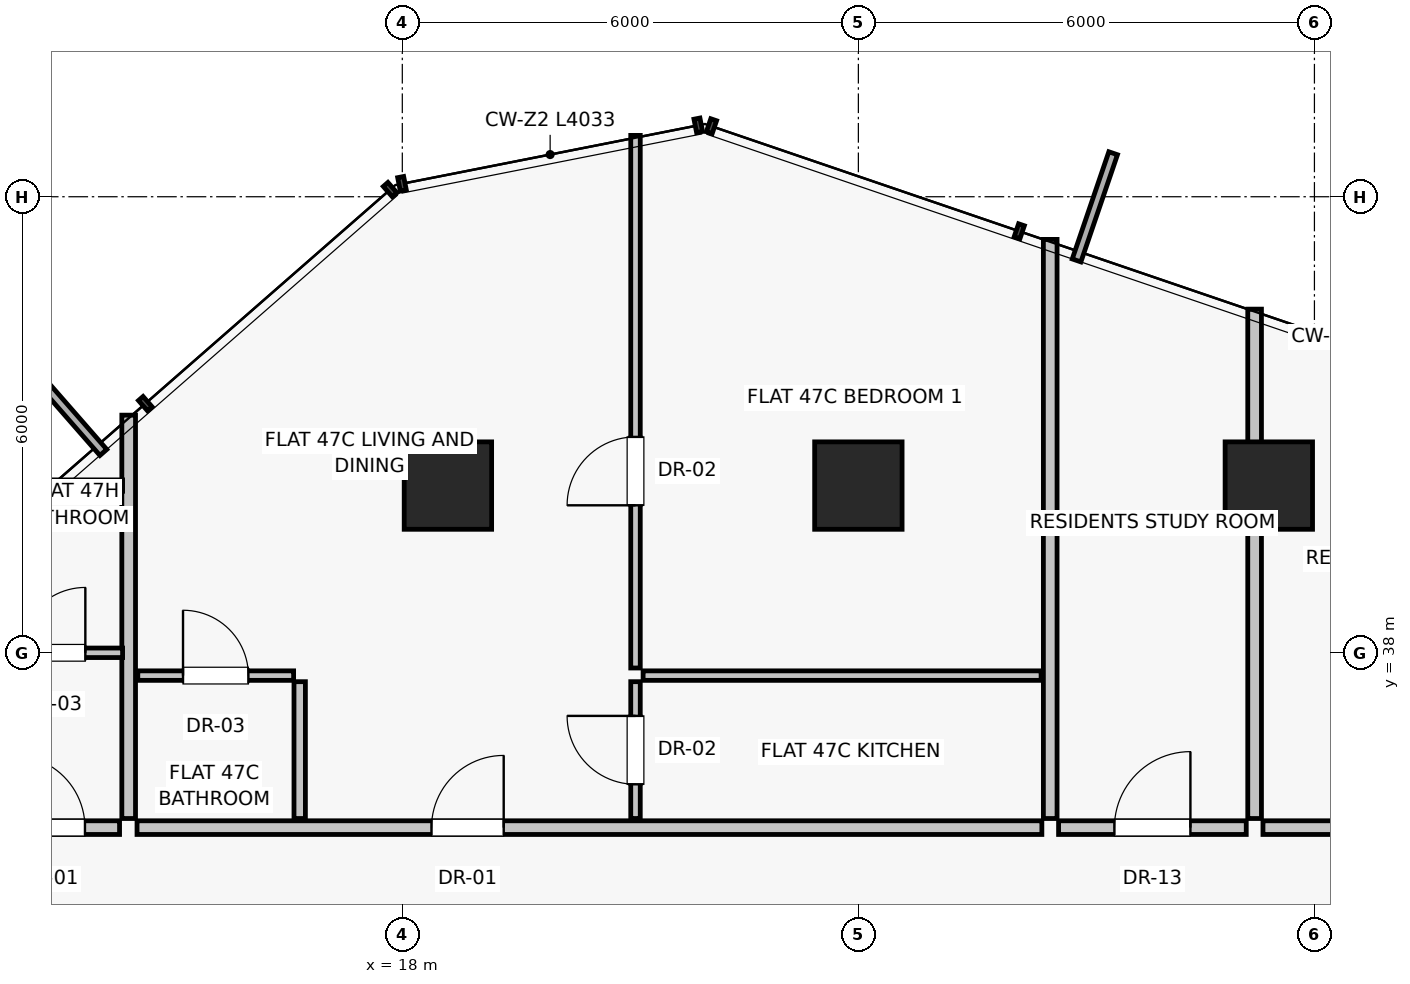
"""IFC4 building model, lengths in metres.
Left out: names, types, materials, properties, quantities, classifications, styles, units other than length and angle.
Written with IfcOpenShell. Run it as: python <this file> out.ifc"""

import sys

from ifc_helpers import new_model, si_unit, direction, frame, frame_2d, origin, origin_2d, place, context, subcontext, project, spatial, rectangle, extrude, source, transform, mapped, element, fill, save


model = new_model("IFC4")
c1 = context("Model", 3, precision=1e-05, world=origin(), true_north=direction((0.0, 1.0)))
c2 = subcontext(c1, "Body", "Model", "MODEL_VIEW")
j1 = project(units=[si_unit("LENGTHUNIT", "METRE"), si_unit("PLANEANGLEUNIT", "RADIAN")], contexts=[c1])
p1 = place(None, origin())
s1 = spatial("IfcSite", under=j1, at=p1, CompositionType="ELEMENT")
p2 = place(p1, origin())
s2 = spatial("IfcBuilding", under=s1, at=p2, CompositionType="ELEMENT")
p3 = place(p2, frame((0.0, 0.0, 166.3)))
s3 = spatial("IfcBuildingStorey", under=s2, at=p3, CompositionType="ELEMENT", Elevation=166.3)
for number, where, z_axis, x_axis in (
    (1, (29.4, 40.2, 0.0), (0.0, 0.0, 1.0), (1.0, 0.0, 0.0)),
    (2, (24.0, 40.2, 0.0), (0.0, 0.0, 1.0), (1.0, 0.0, 0.0)),
    (3, (18.6, 40.2, 0.0), (0.0, 0.0, 1.0), (1.0, 0.0, 0.0)),
):
    element("IfcColumn", number, at=place(p3, frame(where, z_axis=z_axis, x_axis=x_axis)), inside=s3, PredefinedType="COLUMN", context=c2, shape_type="SweptSolid", body=[
        extrude(rectangle(XDim=1.15, YDim=1.15, at=origin_2d()), origin(), (0.0, 0.0, 1.0), 3.25),
    ])
p4 = place(p3, frame((14.4, 35.82, 0.0), z_axis=(0.0, 0.0, 1.0), x_axis=(0.0, 1.0, 0.0)))
e4 = element("IfcWall", 4, at=p4, inside=s3, PredefinedType="PARTITIONING", context=c2, shape_type="SweptSolid", body=[
    extrude(rectangle(XDim=5.306, YDim=0.18, at=frame_2d((2.653, 0.0))), origin(), (0.0, 0.0, 1.0), 2.93),
])
p5 = place(p3, frame((14.51, 35.7, 0.0), z_axis=(0.0, 0.0, 1.0), x_axis=(1.0, 0.0, 0.0)))
e5 = element("IfcWall", 5, at=p5, inside=s3, PredefinedType="PARTITIONING", context=c2, shape_type="SweptSolid", body=[
    extrude(rectangle(XDim=11.904, YDim=0.18, at=frame_2d((5.952, 0.0))), origin(), (0.0, 0.0, 1.0), 2.51),
])
p6 = place(p5, frame((3.874, 0.0, 0.0)))
e6 = element("IfcOpeningElement", 6, at=p6, cuts=e5, PredefinedType="OPENING", context=c2, shape_type="SweptSolid", body=[
    extrude(rectangle(XDim=0.95, YDim=2.02, at=frame_2d((0.475, 1.01))), frame((0.0, 0.1, 0.0), z_axis=(0.0, -1.0, 0.0), x_axis=(1.0, 0.0, 0.0)), (0.0, 0.0, 1.0), 0.2),
])
p7 = place(p3, frame((16.65, 35.82, 0.0), z_axis=(0.0, 0.0, 1.0), x_axis=(0.0, 1.0, 0.0)))
e7 = element("IfcWall", 7, at=p7, inside=s3, PredefinedType="PARTITIONING", context=c2, shape_type="SweptSolid", body=[
    extrude(rectangle(XDim=1.8, YDim=0.15, at=frame_2d((0.9, 0.0))), origin(), (0.0, 0.0, 1.0), 2.93),
])
p8 = place(p3, frame((14.52, 37.7, 0.0), z_axis=(0.0, 0.0, 1.0), x_axis=(1.0, 0.0, 0.0)))
e8 = element("IfcWall", 8, at=p8, inside=s3, PredefinedType="PARTITIONING", context=c2, shape_type="SweptSolid", body=[
    extrude(rectangle(XDim=2.05, YDim=0.125, at=frame_2d((1.025, 0.0))), origin(), (0.0, 0.0, 1.0), 2.93),
])
p9 = place(p8, frame((0.595, 0.0, 0.0)))
e9 = element("IfcOpeningElement", 9, at=p9, cuts=e8, PredefinedType="OPENING", context=c2, shape_type="SweptSolid", body=[
    extrude(rectangle(XDim=0.86, YDim=2.01, at=frame_2d((0.43, 1.005))), frame((0.0, 0.073, 0.0), z_axis=(0.0, -1.0, 0.0), x_axis=(1.0, 0.0, 0.0)), (0.0, 0.0, 1.0), 0.145),
])
p10 = place(p3, frame((21.068, 35.82, 0.0), z_axis=(0.0, 0.0, 1.0), x_axis=(0.0, 1.0, 0.0)))
e10 = element("IfcWall", 10, at=p10, inside=s3, PredefinedType="PARTITIONING", context=c2, shape_type="SweptSolid", body=[
    extrude(rectangle(XDim=1.8, YDim=0.125, at=frame_2d((0.9, 0.0))), origin(), (0.0, 0.0, 1.0), 2.93),
])
p11 = place(p10, frame((0.45, 0.0, 0.0)))
e11 = element("IfcOpeningElement", 11, at=p11, cuts=e10, PredefinedType="OPENING", context=c2, shape_type="SweptSolid", body=[
    extrude(rectangle(XDim=0.9, YDim=2.01, at=frame_2d((0.45, 1.005))), frame((0.0, 0.073, 0.0), z_axis=(0.0, -1.0, 0.0), x_axis=(1.0, 0.0, 0.0)), (0.0, 0.0, 1.0), 0.145),
])
p12 = place(p3, frame((21.168, 37.7, 0.0), z_axis=(0.0, 0.0, 1.0), x_axis=(1.0, 0.0, 0.0)))
e12 = element("IfcWall", 12, at=p12, inside=s3, PredefinedType="PARTITIONING", context=c2, shape_type="SweptSolid", body=[
    extrude(rectangle(XDim=5.236, YDim=0.125, at=frame_2d((2.618, 0.0))), origin(), (0.0, 0.0, 1.0), 2.93),
])
p13 = place(p3, frame((21.068, 37.8, 0.0), z_axis=(0.0, 0.0, 1.0), x_axis=(0.0, 1.0, 0.0)))
e13 = element("IfcWall", 13, at=p13, inside=s3, PredefinedType="PARTITIONING", context=c2, shape_type="SweptSolid", body=[
    extrude(rectangle(XDim=7.007, YDim=0.125, at=frame_2d((3.503, 0.0))), origin(), (0.0, 0.0, 1.0), 2.93),
])
p14 = place(p13, frame((2.14, 0.0, 0.0)))
e14 = element("IfcOpeningElement", 14, at=p14, cuts=e13, PredefinedType="OPENING", context=c2, shape_type="SweptSolid", body=[
    extrude(rectangle(XDim=0.9, YDim=2.01, at=frame_2d((0.45, 1.005))), frame((0.0, 0.073, 0.0), z_axis=(0.0, -1.0, 0.0), x_axis=(1.0, 0.0, 0.0)), (0.0, 0.0, 1.0), 0.145),
])
p15 = place(p3, frame((26.524, 35.82, 0.0), z_axis=(0.0, 0.0, 1.0), x_axis=(0.0, 1.0, 0.0)))
e15 = element("IfcWall", 15, at=p15, inside=s3, PredefinedType="PARTITIONING", context=c2, shape_type="SweptSolid", body=[
    extrude(rectangle(XDim=7.619, YDim=0.18, at=frame_2d((3.809, 0.0))), origin(), (0.0, 0.0, 1.0), 2.93),
])
p16 = place(p3, frame((26.634, 35.7, 0.0), z_axis=(0.0, 0.0, 1.0), x_axis=(1.0, 0.0, 0.0)))
e16 = element("IfcWall", 16, at=p16, inside=s3, PredefinedType="PARTITIONING", context=c2, shape_type="SweptSolid", body=[
    extrude(rectangle(XDim=2.469, YDim=0.18, at=frame_2d((1.234, 0.0))), origin(), (0.0, 0.0, 1.0), 2.51),
])
p17 = place(p16, frame((0.735, 0.0, 0.0)))
e17 = element("IfcOpeningElement", 17, at=p17, cuts=e16, PredefinedType="OPENING", context=c2, shape_type="SweptSolid", body=[
    extrude(rectangle(XDim=1.0, YDim=2.01, at=frame_2d((0.5, 1.005))), frame((0.0, 0.1, 0.0), z_axis=(0.0, -1.0, 0.0), x_axis=(1.0, 0.0, 0.0)), (0.0, 0.0, 1.0), 0.2),
])
p18 = place(p3, frame((29.323, 35.7, 0.0), z_axis=(0.0, 0.0, 1.0), x_axis=(1.0, 0.0, 0.0)))
e18 = element("IfcWall", 18, at=p18, inside=s3, PredefinedType="PARTITIONING", context=c2, shape_type="SweptSolid", body=[
    extrude(rectangle(XDim=4.167, YDim=0.18, at=frame_2d((2.083, 0.0))), origin(), (0.0, 0.0, 1.0), 2.51),
])
p19 = place(p18, frame((1.583, 0.0, 0.0)))
e19 = element("IfcOpeningElement", 19, at=p19, cuts=e18, PredefinedType="OPENING", context=c2, shape_type="SweptSolid", body=[
    extrude(rectangle(XDim=1.0, YDim=2.01, at=frame_2d((0.5, 1.005))), frame((0.0, 0.1, 0.0), z_axis=(0.0, -1.0, 0.0), x_axis=(1.0, 0.0, 0.0)), (0.0, 0.0, 1.0), 0.2),
])
p20 = place(p3, frame((29.213, 35.82, 0.0), z_axis=(0.0, 0.0, 1.0), x_axis=(0.0, 1.0, 0.0)))
e20 = element("IfcWall", 20, at=p20, inside=s3, PredefinedType="PARTITIONING", context=c2, shape_type="SweptSolid", body=[
    extrude(rectangle(XDim=6.701, YDim=0.18, at=frame_2d((3.351, 0.0))), origin(), (0.0, 0.0, 1.0), 2.308),
])
p21 = place(p3, frame((12.42, 35.7, 0.0), z_axis=(0.0, 0.0, 1.0), x_axis=(1.0, 0.0, 0.0)))
e21 = element("IfcWall", 21, at=p21, inside=s3, PredefinedType="PARTITIONING", context=c2, shape_type="SweptSolid", body=[
    extrude(rectangle(XDim=1.86, YDim=0.18, at=frame_2d((0.93, 0.0))), origin(), (0.0, 0.0, 1.0), 2.93),
])
p22 = place(p21, frame((0.455, 0.0, 0.0)))
e22 = element("IfcOpeningElement", 22, at=p22, cuts=e21, PredefinedType="OPENING", context=c2, shape_type="SweptSolid", body=[
    extrude(rectangle(XDim=0.95, YDim=2.02, at=frame_2d((0.475, 1.01))), frame((0.0, 0.1, 0.0), z_axis=(0.0, -1.0, 0.0), x_axis=(1.0, 0.0, 0.0)), (0.0, 0.0, 1.0), 0.2),
])
p23 = place(p3, frame((12.48, 38.0, 0.0), z_axis=(0.0, 0.0, 1.0), x_axis=(1.0, 0.0, 0.0)))
e23 = element("IfcWall", 23, at=p23, inside=s3, PredefinedType="PARTITIONING", context=c2, shape_type="SweptSolid", body=[
    extrude(rectangle(XDim=1.84, YDim=0.125, at=frame_2d((0.92, 0.0))), origin(), (0.0, 0.0, 1.0), 2.93),
])
p24 = place(p23, frame((0.49, 0.0, 0.0)))
e24 = element("IfcOpeningElement", 24, at=p24, cuts=e23, PredefinedType="OPENING", context=c2, shape_type="SweptSolid", body=[
    extrude(rectangle(XDim=0.86, YDim=2.01, at=frame_2d((0.43, 1.005))), frame((0.0, 0.073, 0.0), z_axis=(0.0, -1.0, 0.0), x_axis=(1.0, 0.0, 0.0)), (0.0, 0.0, 1.0), 0.145),
])
p25 = place(p3, frame((13.34, 40.2, 0.0), z_axis=(0.0, 0.0, 1.0), x_axis=(1.0, 0.0, 0.0)))
e25 = element("IfcWall", 25, at=p25, inside=s3, PredefinedType="PARTITIONING", context=c2, shape_type="SweptSolid", body=[
    extrude(rectangle(XDim=0.98, YDim=0.15, at=frame_2d((0.49, 0.0))), origin(), (0.0, 0.0, 1.0), 2.93),
])
m1 = source(origin(), c2, "Body", "SweptSolid", [
    extrude(rectangle(XDim=0.95, YDim=2.02, at=frame_2d((0.475, 1.01))), frame((0.0, 0.025, 0.0), z_axis=(0.0, -1.0, 0.0), x_axis=(1.0, 0.0, 0.0)), (0.0, 0.0, 1.0), 0.05),
])
p26 = place(p6, origin())
e26 = element("IfcDoor", 26, at=p26, inside=s3, OperationType="SINGLE_SWING_RIGHT", PredefinedType="DOOR", context=c2, shape_type="MappedRepresentation", body=[
    mapped(m1, transform((0.0, 0.0, 0.0), scale=1.0)),
])
fill(e6, e26)
m2 = source(origin(), c2, "Body", "SweptSolid", [
    extrude(rectangle(XDim=0.86, YDim=2.01, at=frame_2d((0.43, 1.005))), frame((0.0, 0.025, 0.0), z_axis=(0.0, -1.0, 0.0), x_axis=(1.0, 0.0, 0.0)), (0.0, 0.0, 1.0), 0.05),
])
p27 = place(p9, origin())
e27 = element("IfcDoor", 27, at=p27, inside=s3, OperationType="SINGLE_SWING_LEFT", PredefinedType="DOOR", context=c2, shape_type="MappedRepresentation", body=[
    mapped(m2, transform((0.0, 0.0, 0.0), scale=1.0)),
])
fill(e9, e27)
m3 = source(origin(), c2, "Body", "SweptSolid", [
    extrude(rectangle(XDim=0.9, YDim=2.01, at=frame_2d((0.45, 1.005))), frame((0.0, 0.025, 0.0), z_axis=(0.0, -1.0, 0.0), x_axis=(1.0, 0.0, 0.0)), (0.0, 0.0, 1.0), 0.05),
])
p28 = place(p11, origin())
e28 = element("IfcDoor", 28, at=p28, inside=s3, OperationType="SINGLE_SWING_RIGHT", PredefinedType="DOOR", context=c2, shape_type="MappedRepresentation", body=[
    mapped(m3, transform((0.0, 0.0, 0.0), scale=1.0)),
])
fill(e11, e28)
p29 = place(p14, origin())
e29 = element("IfcDoor", 29, at=p29, inside=s3, OperationType="SINGLE_SWING_LEFT", PredefinedType="DOOR", context=c2, shape_type="MappedRepresentation", body=[
    mapped(m3, transform((0.0, 0.0, 0.0), scale=1.0)),
])
fill(e14, e29)
m4 = source(origin(), c2, "Body", "SweptSolid", [
    extrude(rectangle(XDim=1.0, YDim=2.01, at=frame_2d((0.5, 1.005))), frame((0.0, 0.025, 0.0), z_axis=(0.0, -1.0, 0.0), x_axis=(1.0, 0.0, 0.0)), (0.0, 0.0, 1.0), 0.05),
])
p30 = place(p17, origin())
e30 = element("IfcDoor", 30, at=p30, inside=s3, OperationType="SINGLE_SWING_RIGHT", PredefinedType="DOOR", context=c2, shape_type="MappedRepresentation", body=[
    mapped(m4, transform((0.0, 0.0, 0.0), scale=1.0)),
])
fill(e17, e30)
p31 = place(p22, origin())
e31 = element("IfcDoor", 31, at=p31, inside=s3, OperationType="SINGLE_SWING_LEFT", PredefinedType="DOOR", context=c2, shape_type="MappedRepresentation", body=[
    mapped(m1, transform((0.0, 0.0, 0.0), scale=1.0)),
])
fill(e22, e31)
p32 = place(p24, origin())
e32 = element("IfcDoor", 32, at=p32, inside=s3, OperationType="SINGLE_SWING_RIGHT", PredefinedType="DOOR", context=c2, shape_type="MappedRepresentation", body=[
    mapped(m2, transform((0.0, 0.0, 0.0), scale=1.0)),
])
fill(e24, e32)
save(model, sys.argv[1])
